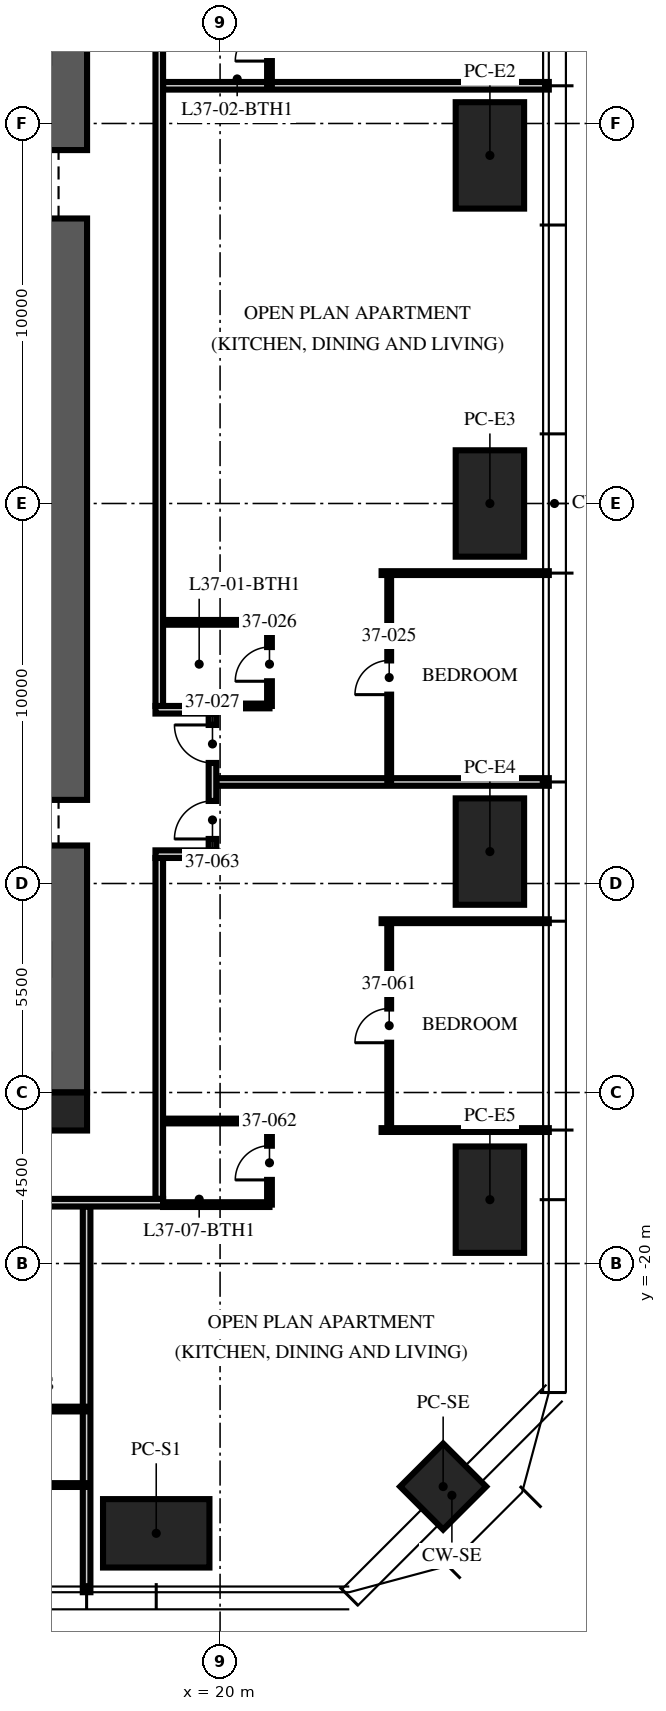
"""IFC4 building model, lengths in metres.
Left out: names, types, materials, properties, quantities, classifications, styles, units other than length and angle.
Written with IfcOpenShell. Run it as: python <this file> out.ifc"""

import sys

from ifc_helpers import new_model, si_unit, direction, frame, frame_2d, origin, origin_2d, place, context, subcontext, project, spatial, rectangle, extrude, element, fill, save


model = new_model("IFC4")
c1 = context("Model", 3, precision=1e-05, world=origin(), true_north=direction((0.0, 1.0)))
c2 = subcontext(c1, "Body", "Model", "MODEL_VIEW")
j1 = project(units=[si_unit("LENGTHUNIT", "METRE"), si_unit("PLANEANGLEUNIT", "RADIAN")], contexts=[c1])
p1 = place(None, origin())
s1 = spatial("IfcSite", under=j1, at=p1, CompositionType="ELEMENT")
p2 = place(p1, origin())
s2 = spatial("IfcBuilding", under=s1, at=p2, CompositionType="ELEMENT")
p3 = place(p2, frame((0.0, 0.0, 148.5)))
s3 = spatial("IfcBuildingStorey", under=s2, at=p3, CompositionType="ELEMENT", Elevation=148.5)
p4 = place(p3, frame((15.5, -15.5, -0.25), z_axis=(0.0, 0.0, 1.0), x_axis=(0.0, 1.0, 0.0)))
e1 = element("IfcWall", 1, at=p4, inside=s3, PredefinedType="SHEAR", context=c2, shape_type="SweptSolid", body=[
    extrude(rectangle(XDim=31.0, YDim=2.0, at=frame_2d((15.5, 0.0))), origin(), (0.0, 0.0, 1.0), 3.75),
])
p5 = place(p4, frame((6.5, 0.0, 0.25)))
e2 = element("IfcOpeningElement", 2, at=p5, cuts=e1, PredefinedType="OPENING", context=c2, shape_type="SweptSolid", body=[
    extrude(rectangle(XDim=1.2, YDim=2.1, at=frame_2d((0.6, 1.05))), frame((0.0, 1.01, 0.0), z_axis=(0.0, -1.0, 0.0), x_axis=(1.0, 0.0, 0.0)), (0.0, 0.0, 1.0), 2.02),
])
p6 = place(p4, frame((23.0, 0.0, 0.25)))
e3 = element("IfcOpeningElement", 3, at=p6, cuts=e1, PredefinedType="OPENING", context=c2, shape_type="SweptSolid", body=[
    extrude(rectangle(XDim=1.8, YDim=2.1, at=frame_2d((0.9, 1.05))), frame((0.0, 1.01, 0.0), z_axis=(0.0, -1.0, 0.0), x_axis=(1.0, 0.0, 0.0)), (0.0, 0.0, 1.0), 2.02),
])
p7 = place(p3, frame((16.0, -16.0, -0.25), z_axis=(0.0, 0.0, 1.0), x_axis=(1.0, 0.0, 0.0)))
e4 = element("IfcColumn", 4, at=p7, inside=s3, PredefinedType="COLUMN", context=c2, shape_type="SweptSolid", body=[
    extrude(rectangle(XDim=1.0, YDim=1.0, at=origin_2d()), origin(), (0.0, 0.0, 1.0), 3.75),
])
for number, where, z_axis, x_axis in (
    (5, (27.1, 9.16, 0.0), (0.0, 0.0, 1.0), (0.0, 1.0, 0.0)),
    (6, (27.1, 0.0, 0.0), (0.0, 0.0, 1.0), (0.0, 1.0, 0.0)),
    (7, (27.1, -9.16, 0.0), (0.0, 0.0, 1.0), (0.0, 1.0, 0.0)),
    (8, (27.1, -18.32, 0.0), (0.0, 0.0, 1.0), (0.0, 1.0, 0.0)),
    (9, (18.32, -27.1, 0.0), (0.0, 0.0, 1.0), (1.0, 0.0, 0.0)),
):
    element("IfcColumn", number, at=place(p3, frame(where, z_axis=z_axis, x_axis=x_axis)), inside=s3, PredefinedType="COLUMN", context=c2, shape_type="SweptSolid", body=[
        extrude(rectangle(XDim=2.8, YDim=1.8, at=origin_2d()), origin(), (0.0, 0.0, 1.0), 3.75),
    ])
p8 = place(p3, frame((25.87, -25.87, 0.0), z_axis=(0.0, 0.0, 1.0), x_axis=(0.707106781187, 0.707106781187, 0.0)))
e10 = element("IfcColumn", 10, at=p8, inside=s3, PredefinedType="COLUMN", context=c2, shape_type="SweptSolid", body=[
    extrude(rectangle(XDim=1.6, YDim=1.6, at=origin_2d()), origin(), (0.0, 0.0, 1.0), 3.75),
])
p9 = place(p3, frame((19.9, -7.328, 0.0), z_axis=(0.0, 0.0, 1.0), x_axis=(1.0, 0.0, 0.0)))
e11 = element("IfcWall", 11, at=p9, inside=s3, PredefinedType="PARTITIONING", context=c2, shape_type="SweptSolid", body=[
    extrude(rectangle(XDim=8.75, YDim=0.2, at=frame_2d((4.375, 0.0))), origin(), (0.0, 0.0, 1.0), 2.81),
])
p10 = place(p3, frame((24.25, -1.832, 0.0), z_axis=(0.0, 0.0, 1.0), x_axis=(1.0, 0.0, 0.0)))
e12 = element("IfcWall", 12, at=p10, inside=s3, PredefinedType="PARTITIONING", context=c2, shape_type="SweptSolid", body=[
    extrude(rectangle(XDim=4.4, YDim=0.1, at=frame_2d((2.2, 0.0))), origin(), (0.0, 0.0, 1.0), 2.81),
])
for number, where, z_axis, x_axis in (
    (13, (18.5, 10.992, 0.0), (0.0, 0.0, 1.0), (1.0, 0.0, 0.0)),
    (14, (16.488, -18.5, 0.0), (0.0, 0.0, 1.0), (0.0, -1.0, 0.0)),
):
    element("IfcWall", number, at=place(p3, frame(where, z_axis=z_axis, x_axis=x_axis)), inside=s3, PredefinedType="PARTITIONING", context=c2, shape_type="SweptSolid", body=[
        extrude(rectangle(XDim=10.15, YDim=0.2, at=frame_2d((5.075, 0.0))), origin(), (0.0, 0.0, 1.0), 2.81),
    ])
for number, where, z_axis, x_axis in (
    (15, (24.25, -16.488, 0.0), (0.0, 0.0, 1.0), (1.0, 0.0, 0.0)),
    (16, (24.25, -10.992, 0.0), (0.0, 0.0, 1.0), (1.0, 0.0, 0.0)),
):
    element("IfcWall", number, at=place(p3, frame(where, z_axis=z_axis, x_axis=x_axis)), inside=s3, PredefinedType="PARTITIONING", context=c2, shape_type="SweptSolid", body=[
        extrude(rectangle(XDim=4.4, YDim=0.1, at=frame_2d((2.2, 0.0))), origin(), (0.0, 0.0, 1.0), 2.81),
    ])
p11 = place(p3, frame((24.45, -7.328, 0.0), z_axis=(0.0, 0.0, 1.0), x_axis=(0.0, 1.0, 0.0)))
e17 = element("IfcWall", 17, at=p11, inside=s3, PredefinedType="PARTITIONING", context=c2, shape_type="SweptSolid", body=[
    extrude(rectangle(XDim=5.496, YDim=0.1, at=frame_2d((2.748, 0.0))), origin(), (0.0, 0.0, 1.0), 2.81),
])
p12 = place(p11, frame((2.298, 0.0, 0.0)))
e18 = element("IfcOpeningElement", 18, at=p12, cuts=e17, PredefinedType="OPENING", context=c2, shape_type="SweptSolid", body=[
    extrude(rectangle(XDim=0.9, YDim=2.1, at=frame_2d((0.45, 1.05))), frame((0.0, 0.06, 0.0), z_axis=(0.0, -1.0, 0.0), x_axis=(1.0, 0.0, 0.0)), (0.0, 0.0, 1.0), 0.12),
])
p13 = place(p3, frame((21.3, -5.328, 0.0), z_axis=(0.0, 0.0, 1.0), x_axis=(0.0, 1.0, 0.0)))
e19 = element("IfcWall", 19, at=p13, inside=s3, PredefinedType="PARTITIONING", context=c2, shape_type="SweptSolid", body=[
    extrude(rectangle(XDim=2.2, YDim=0.125, at=frame_2d((1.1, 0.0))), origin(), (0.0, 0.0, 1.0), 2.81),
])
p14 = place(p13, frame((0.65, 0.0, 0.0)))
e20 = element("IfcOpeningElement", 20, at=p14, cuts=e19, PredefinedType="OPENING", context=c2, shape_type="SweptSolid", body=[
    extrude(rectangle(XDim=0.9, YDim=2.1, at=frame_2d((0.45, 1.05))), frame((0.0, 0.073, 0.0), z_axis=(0.0, -1.0, 0.0), x_axis=(1.0, 0.0, 0.0)), (0.0, 0.0, 1.0), 0.145),
])
p15 = place(p3, frame((19.97, -5.328, 0.0), z_axis=(0.0, 0.0, 1.0), x_axis=(1.0, 0.0, 0.0)))
e21 = element("IfcWall", 21, at=p15, inside=s3, PredefinedType="PARTITIONING", context=c2, shape_type="SweptSolid", body=[
    extrude(rectangle(XDim=1.33, YDim=0.125, at=frame_2d((0.665, 0.0))), origin(), (0.0, 0.0, 1.0), 3.5),
])
p16 = place(p3, frame((18.5, -3.128, 0.0), z_axis=(0.0, 0.0, 1.0), x_axis=(1.0, 0.0, 0.0)))
e22 = element("IfcWall", 22, at=p16, inside=s3, PredefinedType="PARTITIONING", context=c2, shape_type="SweptSolid", body=[
    extrude(rectangle(XDim=2.8, YDim=0.125, at=frame_2d((1.4, 0.0))), origin(), (0.0, 0.0, 1.0), 3.5),
])
p17 = place(p3, frame((21.3, 10.992, 0.0), z_axis=(0.0, 0.0, 1.0), x_axis=(0.0, 1.0, 0.0)))
e23 = element("IfcWall", 23, at=p17, inside=s3, PredefinedType="PARTITIONING", context=c2, shape_type="SweptSolid", body=[
    extrude(rectangle(XDim=2.2, YDim=0.125, at=frame_2d((1.1, 0.0))), origin(), (0.0, 0.0, 1.0), 3.5),
])
p18 = place(p17, frame((0.65, 0.0, 0.0)))
e24 = element("IfcOpeningElement", 24, at=p18, cuts=e23, PredefinedType="OPENING", context=c2, shape_type="SweptSolid", body=[
    extrude(rectangle(XDim=0.9, YDim=2.1, at=frame_2d((0.45, 1.05))), frame((0.0, 0.073, 0.0), z_axis=(0.0, -1.0, 0.0), x_axis=(1.0, 0.0, 0.0)), (0.0, 0.0, 1.0), 0.145),
])
p19 = place(p3, frame((10.992, -25.83, 0.0), z_axis=(0.0, 0.0, 1.0), x_axis=(1.0, 0.0, 0.0)))
e25 = element("IfcWall", 25, at=p19, inside=s3, PredefinedType="PARTITIONING", context=c2, shape_type="SweptSolid", body=[
    extrude(rectangle(XDim=5.496, YDim=0.1, at=frame_2d((2.748, 0.0))), origin(), (0.0, 0.0, 1.0), 2.81),
])
p20 = place(p19, frame((0.15, 0.0, 0.0)))
e26 = element("IfcOpeningElement", 26, at=p20, cuts=e25, PredefinedType="OPENING", context=c2, shape_type="SweptSolid", body=[
    extrude(rectangle(XDim=0.9, YDim=2.1, at=frame_2d((0.45, 1.05))), frame((0.0, 0.06, 0.0), z_axis=(0.0, -1.0, 0.0), x_axis=(1.0, 0.0, 0.0)), (0.0, 0.0, 1.0), 0.12),
])
p21 = place(p19, frame((2.898, 0.0, 0.0)))
e27 = element("IfcOpeningElement", 27, at=p21, cuts=e25, PredefinedType="OPENING", context=c2, shape_type="SweptSolid", body=[
    extrude(rectangle(XDim=0.9, YDim=2.1, at=frame_2d((0.45, 1.05))), frame((0.0, 0.06, 0.0), z_axis=(0.0, -1.0, 0.0), x_axis=(1.0, 0.0, 0.0)), (0.0, 0.0, 1.0), 0.12),
])
p22 = place(p3, frame((12.192, -23.83, 0.0), z_axis=(0.0, 0.0, 1.0), x_axis=(1.0, 0.0, 0.0)))
e28 = element("IfcWall", 28, at=p22, inside=s3, PredefinedType="PARTITIONING", context=c2, shape_type="SweptSolid", body=[
    extrude(rectangle(XDim=4.296, YDim=0.125, at=frame_2d((2.148, 0.0))), origin(), (0.0, 0.0, 1.0), 2.81),
])
p23 = place(p3, frame((24.45, -16.488, 0.0), z_axis=(0.0, 0.0, 1.0), x_axis=(0.0, 1.0, 0.0)))
e29 = element("IfcWall", 29, at=p23, inside=s3, PredefinedType="PARTITIONING", context=c2, shape_type="SweptSolid", body=[
    extrude(rectangle(XDim=5.496, YDim=0.1, at=frame_2d((2.748, 0.0))), origin(), (0.0, 0.0, 1.0), 2.81),
])
p24 = place(p23, frame((2.298, 0.0, 0.0)))
e30 = element("IfcOpeningElement", 30, at=p24, cuts=e29, PredefinedType="OPENING", context=c2, shape_type="SweptSolid", body=[
    extrude(rectangle(XDim=0.9, YDim=2.1, at=frame_2d((0.45, 1.05))), frame((0.0, 0.06, 0.0), z_axis=(0.0, -1.0, 0.0), x_axis=(1.0, 0.0, 0.0)), (0.0, 0.0, 1.0), 0.12),
])
p25 = place(p3, frame((21.3, -18.45, 0.0), z_axis=(0.0, 0.0, 1.0), x_axis=(0.0, 1.0, 0.0)))
e31 = element("IfcWall", 31, at=p25, inside=s3, PredefinedType="PARTITIONING", context=c2, shape_type="SweptSolid", body=[
    extrude(rectangle(XDim=2.2, YDim=0.125, at=frame_2d((1.1, 0.0))), origin(), (0.0, 0.0, 1.0), 2.7),
])
p26 = place(p25, frame((0.65, 0.0, 0.0)))
e32 = element("IfcOpeningElement", 32, at=p26, cuts=e31, PredefinedType="OPENING", context=c2, shape_type="SweptSolid", body=[
    extrude(rectangle(XDim=0.9, YDim=2.1, at=frame_2d((0.45, 1.05))), frame((0.0, 0.073, 0.0), z_axis=(0.0, -1.0, 0.0), x_axis=(1.0, 0.0, 0.0)), (0.0, 0.0, 1.0), 0.145),
])
p27 = place(p3, frame((18.5, -18.45, 0.0), z_axis=(0.0, 0.0, 1.0), x_axis=(1.0, 0.0, 0.0)))
e33 = element("IfcWall", 33, at=p27, inside=s3, PredefinedType="PARTITIONING", context=c2, shape_type="SweptSolid", body=[
    extrude(rectangle(XDim=2.8, YDim=0.125, at=frame_2d((1.4, 0.0))), origin(), (0.0, 0.0, 1.0), 2.3),
])
p28 = place(p3, frame((18.5, -16.25, 0.0), z_axis=(0.0, 0.0, 1.0), x_axis=(1.0, 0.0, 0.0)))
e34 = element("IfcWall", 34, at=p28, inside=s3, PredefinedType="PARTITIONING", context=c2, shape_type="SweptSolid", body=[
    extrude(rectangle(XDim=2.8, YDim=0.125, at=frame_2d((1.4, 0.0))), origin(), (0.0, 0.0, 1.0), 3.5),
])
p29 = place(p3, frame((18.4, -18.3, 0.0), z_axis=(0.0, 0.0, 1.0), x_axis=(0.0, 1.0, 0.0)))
e35 = element("IfcWall", 35, at=p29, inside=s3, PredefinedType="PARTITIONING", context=c2, shape_type="SweptSolid", body=[
    extrude(rectangle(XDim=8.972, YDim=0.2, at=frame_2d((4.486, 0.0))), origin(), (0.0, 0.0, 1.0), 2.3),
])
p30 = place(p3, frame((18.3, -9.228, 0.0), z_axis=(0.0, 0.0, 1.0), x_axis=(1.0, 0.0, 0.0)))
e36 = element("IfcWall", 36, at=p30, inside=s3, PredefinedType="PARTITIONING", context=c2, shape_type="SweptSolid", body=[
    extrude(rectangle(XDim=1.6, YDim=0.2, at=frame_2d((0.8, 0.0))), origin(), (0.0, 0.0, 1.0), 2.7),
])
p31 = place(p3, frame((18.3, -5.428, 0.0), z_axis=(0.0, 0.0, 1.0), x_axis=(1.0, 0.0, 0.0)))
e37 = element("IfcWall", 37, at=p31, inside=s3, PredefinedType="PARTITIONING", context=c2, shape_type="SweptSolid", body=[
    extrude(rectangle(XDim=1.6, YDim=0.2, at=frame_2d((0.8, 0.0))), origin(), (0.0, 0.0, 1.0), 3.5),
])
p32 = place(p3, frame((19.8, -9.128, 0.0), z_axis=(0.0, 0.0, 1.0), x_axis=(0.0, 1.0, 0.0)))
e38 = element("IfcWall", 38, at=p32, inside=s3, PredefinedType="PARTITIONING", context=c2, shape_type="SweptSolid", body=[
    extrude(rectangle(XDim=3.6, YDim=0.2, at=frame_2d((1.8, 0.0))), origin(), (0.0, 0.0, 1.0), 2.7),
])
p33 = place(p32, frame((2.3, 0.0, 0.0)))
e39 = element("IfcOpeningElement", 39, at=p33, cuts=e38, PredefinedType="OPENING", context=c2, shape_type="SweptSolid", body=[
    extrude(rectangle(XDim=1.0, YDim=2.2, at=frame_2d((0.5, 1.1))), frame((0.0, 0.11, 0.0), z_axis=(0.0, -1.0, 0.0), x_axis=(1.0, 0.0, 0.0)), (0.0, 0.0, 1.0), 0.22),
])
p34 = place(p32, frame((0.3, 0.0, 0.0)))
e40 = element("IfcOpeningElement", 40, at=p34, cuts=e38, PredefinedType="OPENING", context=c2, shape_type="SweptSolid", body=[
    extrude(rectangle(XDim=1.0, YDim=2.2, at=frame_2d((0.5, 1.1))), frame((0.0, 0.11, 0.0), z_axis=(0.0, -1.0, 0.0), x_axis=(1.0, 0.0, 0.0)), (0.0, 0.0, 1.0), 0.22),
])
p35 = place(p3, frame((18.4, -5.328, 0.0), z_axis=(0.0, 0.0, 1.0), x_axis=(0.0, 1.0, 0.0)))
e41 = element("IfcWall", 41, at=p35, inside=s3, PredefinedType="PARTITIONING", context=c2, shape_type="SweptSolid", body=[
    extrude(rectangle(XDim=22.028, YDim=0.2, at=frame_2d((11.014, 0.0))), origin(), (0.0, 0.0, 1.0), 2.7),
])
p36 = place(p35, frame((19.84, 0.0, 0.0)))
e42 = element("IfcOpeningElement", 42, at=p36, cuts=e41, PredefinedType="OPENING", context=c2, shape_type="SweptSolid", body=[
    extrude(rectangle(XDim=1.0, YDim=2.2, at=frame_2d((0.5, 1.1))), frame((0.0, 0.11, 0.0), z_axis=(0.0, -1.0, 0.0), x_axis=(1.0, 0.0, 0.0)), (0.0, 0.0, 1.0), 0.22),
])
p37 = place(p3, frame((18.5, -18.4, 0.0), z_axis=(0.0, 0.0, 1.0), x_axis=(-1.0, 0.0, 0.0)))
e43 = element("IfcWall", 43, at=p37, inside=s3, PredefinedType="PARTITIONING", context=c2, shape_type="SweptSolid", body=[
    extrude(rectangle(XDim=12.9, YDim=0.2, at=frame_2d((6.45, 0.0))), origin(), (0.0, 0.0, 1.0), 2.3),
])
p38 = place(p12, origin())
e44 = element("IfcDoor", 44, at=p38, inside=s3, OperationType="SINGLE_SWING_LEFT", PredefinedType="DOOR", context=c2, shape_type="SweptSolid", body=[
    extrude(rectangle(XDim=0.9, YDim=2.1, at=frame_2d((0.45, 1.05))), frame((0.0, 0.025, 0.0), z_axis=(0.0, -1.0, 0.0), x_axis=(1.0, 0.0, 0.0)), (0.0, 0.0, 1.0), 0.05),
])
fill(e18, e44)
p39 = place(p14, origin())
e45 = element("IfcDoor", 45, at=p39, inside=s3, OperationType="SINGLE_SWING_LEFT", PredefinedType="DOOR", context=c2, shape_type="SweptSolid", body=[
    extrude(rectangle(XDim=0.9, YDim=2.1, at=frame_2d((0.45, 1.05))), frame((0.0, 0.025, 0.0), z_axis=(0.0, -1.0, 0.0), x_axis=(1.0, 0.0, 0.0)), (0.0, 0.0, 1.0), 0.05),
])
fill(e20, e45)
p40 = place(p33, origin())
e46 = element("IfcDoor", 46, at=p40, inside=s3, OperationType="SINGLE_SWING_RIGHT", PredefinedType="DOOR", context=c2, shape_type="SweptSolid", body=[
    extrude(rectangle(XDim=1.0, YDim=2.2, at=frame_2d((0.5, 1.1))), frame((0.0, 0.025, 0.0), z_axis=(0.0, -1.0, 0.0), x_axis=(1.0, 0.0, 0.0)), (0.0, 0.0, 1.0), 0.05),
])
fill(e39, e46)
p41 = place(p18, origin())
e47 = element("IfcDoor", 47, at=p41, inside=s3, OperationType="SINGLE_SWING_LEFT", PredefinedType="DOOR", context=c2, shape_type="SweptSolid", body=[
    extrude(rectangle(XDim=0.9, YDim=2.1, at=frame_2d((0.45, 1.05))), frame((0.0, 0.025, 0.0), z_axis=(0.0, -1.0, 0.0), x_axis=(1.0, 0.0, 0.0)), (0.0, 0.0, 1.0), 0.05),
])
fill(e24, e47)
p42 = place(p24, origin())
e48 = element("IfcDoor", 48, at=p42, inside=s3, OperationType="SINGLE_SWING_LEFT", PredefinedType="DOOR", context=c2, shape_type="SweptSolid", body=[
    extrude(rectangle(XDim=0.9, YDim=2.1, at=frame_2d((0.45, 1.05))), frame((0.0, 0.025, 0.0), z_axis=(0.0, -1.0, 0.0), x_axis=(1.0, 0.0, 0.0)), (0.0, 0.0, 1.0), 0.05),
])
fill(e30, e48)
p43 = place(p26, origin())
e49 = element("IfcDoor", 49, at=p43, inside=s3, OperationType="SINGLE_SWING_LEFT", PredefinedType="DOOR", context=c2, shape_type="SweptSolid", body=[
    extrude(rectangle(XDim=0.9, YDim=2.1, at=frame_2d((0.45, 1.05))), frame((0.0, 0.025, 0.0), z_axis=(0.0, -1.0, 0.0), x_axis=(1.0, 0.0, 0.0)), (0.0, 0.0, 1.0), 0.05),
])
fill(e32, e49)
p44 = place(p34, origin())
e50 = element("IfcDoor", 50, at=p44, inside=s3, OperationType="SINGLE_SWING_LEFT", PredefinedType="DOOR", context=c2, shape_type="SweptSolid", body=[
    extrude(rectangle(XDim=1.0, YDim=2.2, at=frame_2d((0.5, 1.1))), frame((0.0, 0.025, 0.0), z_axis=(0.0, -1.0, 0.0), x_axis=(1.0, 0.0, 0.0)), (0.0, 0.0, 1.0), 0.05),
])
fill(e40, e50)
save(model, sys.argv[1])
